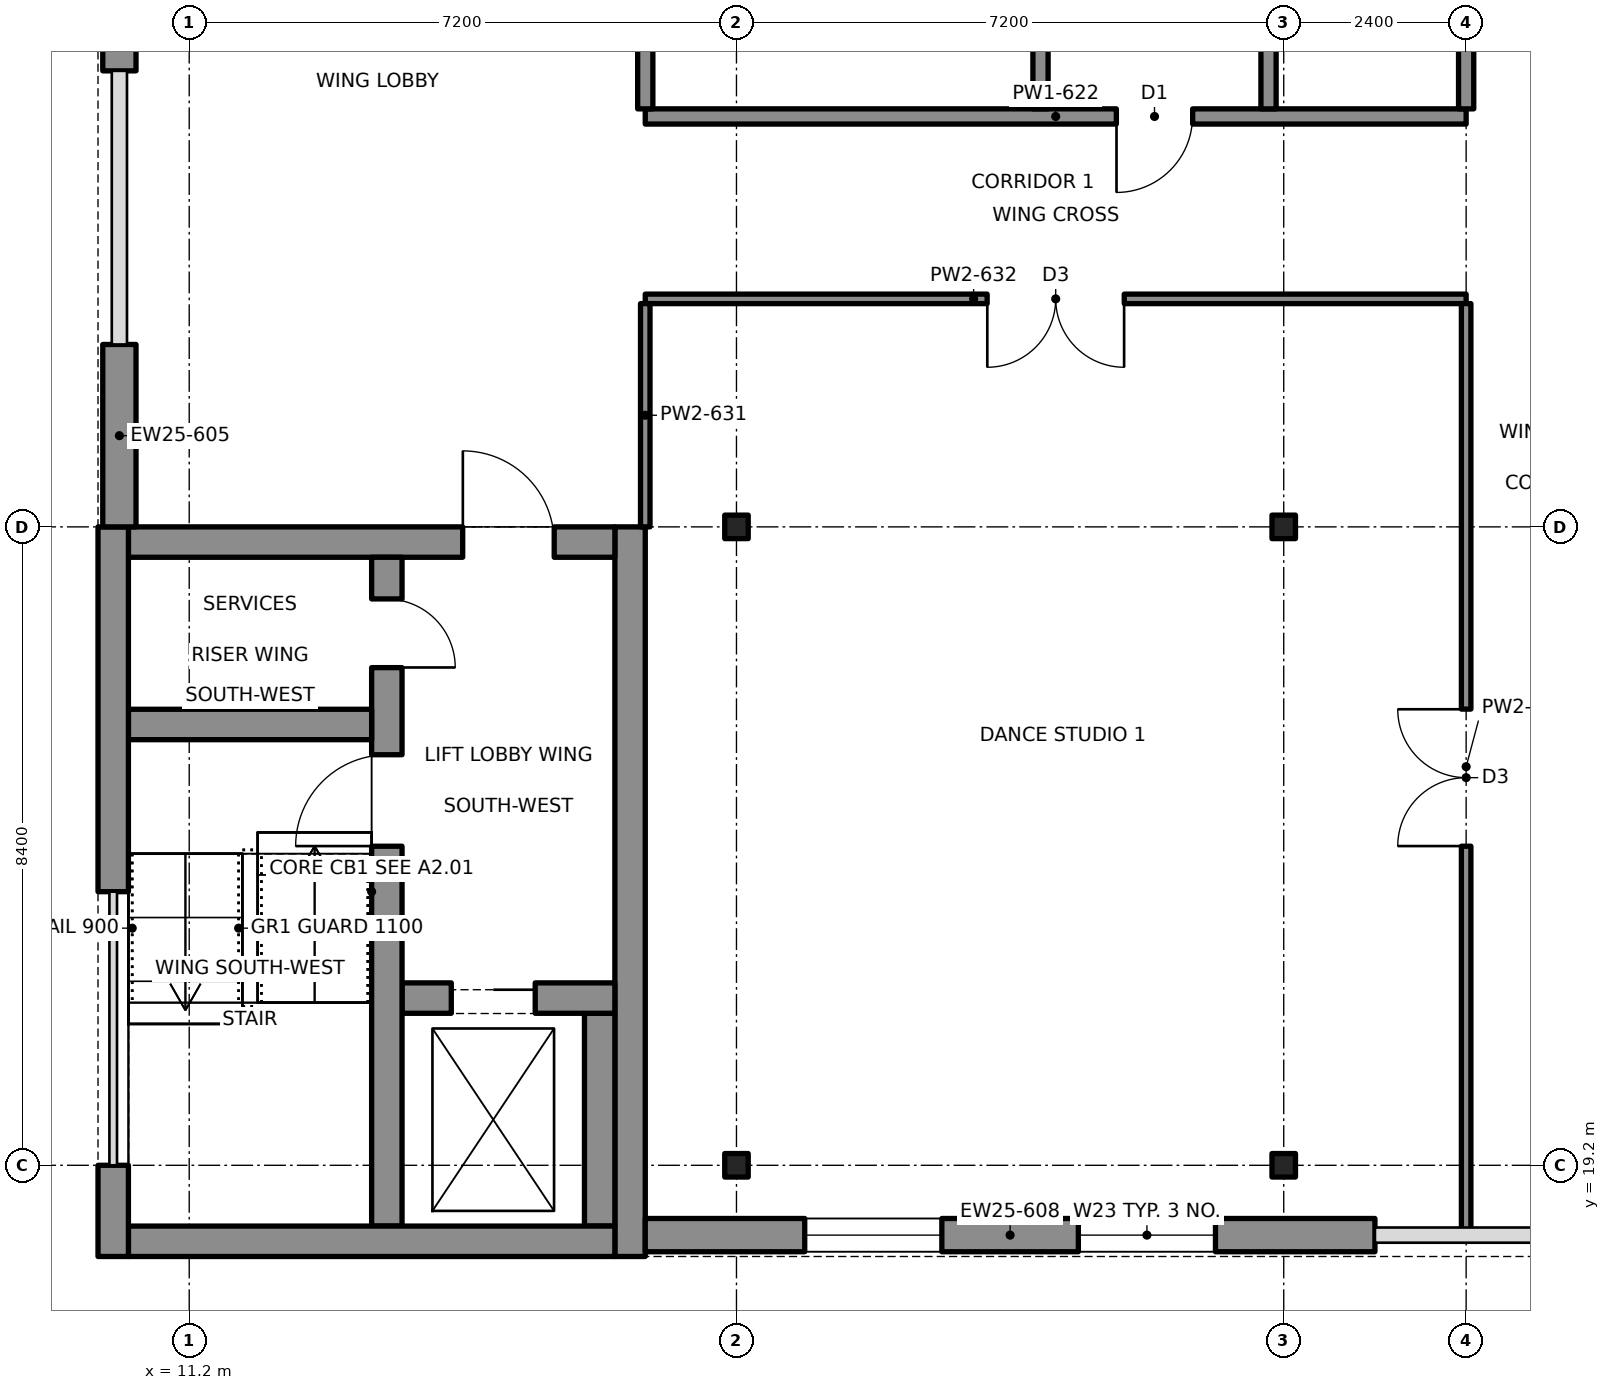
"""IFC4 building model, lengths in metres.
Left out: names, types, materials, properties, quantities, classifications, styles, units other than length and angle.
Written with IfcOpenShell. Run it as: python <this file> out.ifc"""

import sys

from ifc_helpers import new_model, si_unit, direction, frame, frame_2d, origin, origin_2d, place, context, subcontext, project, spatial, rectangle, i_section, extrude, element, fill, save


model = new_model("IFC4")
c1 = context("Model", 3, precision=1e-05, world=origin(), true_north=direction((0.0, 1.0)))
c2 = subcontext(c1, "Body", "Model", "MODEL_VIEW")
j1 = project(units=[si_unit("LENGTHUNIT", "METRE"), si_unit("PLANEANGLEUNIT", "RADIAN")], contexts=[c1])
p1 = place(None, origin())
s1 = spatial("IfcSite", under=j1, at=p1, CompositionType="ELEMENT")
p2 = place(p1, origin())
s2 = spatial("IfcBuilding", under=s1, at=p2, CompositionType="ELEMENT")
p3 = place(p2, frame((0.0, 0.0, 8.8)))
s3 = spatial("IfcBuildingStorey", under=s2, at=p3, CompositionType="ELEMENT", Elevation=8.8)
for number, where, z_axis, x_axis in (
    (1, (18.4, 19.2, 0.0), (0.0, 0.0, 1.0), (1.0, 0.0, 0.0)),
    (2, (18.4, 27.6, 0.0), (0.0, 0.0, 1.0), (1.0, 0.0, 0.0)),
    (3, (25.6, 19.2, 0.0), (0.0, 0.0, 1.0), (1.0, 0.0, 0.0)),
    (4, (25.6, 27.6, 0.0), (0.0, 0.0, 1.0), (1.0, 0.0, 0.0)),
):
    element("IfcColumn", number, at=place(p3, frame(where, z_axis=z_axis, x_axis=x_axis)), inside=s3, PredefinedType="COLUMN", context=c2, shape_type="SweptSolid", body=[
        extrude(i_section(OverallWidth=0.309, OverallDepth=0.323, WebThickness=0.014, FlangeThickness=0.023, at=origin_2d()), origin(), (0.0, 0.0, 1.0), 5.2),
    ])
p4 = place(p3, frame((17.2, 18.281, 0.0), z_axis=(0.0, 0.0, 1.0), x_axis=(1.0, 0.0, 0.0)))
e5 = element("IfcWall", 5, at=p4, inside=s3, PredefinedType="SOLIDWALL", context=c2, shape_type="SweptSolid", body=[
    extrude(rectangle(XDim=9.6, YDim=0.438, at=frame_2d((4.8, 0.0))), origin(), (0.0, 0.0, 1.0), 5.2),
])
p5 = place(p4, frame((2.1, 0.0, 0.8)))
e6 = element("IfcOpeningElement", 6, at=p5, cuts=e5, PredefinedType="OPENING", context=c2, shape_type="SweptSolid", body=[
    extrude(rectangle(XDim=1.8, YDim=3.6, at=frame_2d((0.9, 1.8))), frame((0.0, 0.229, 0.0), z_axis=(0.0, -1.0, 0.0), x_axis=(1.0, 0.0, 0.0)), (0.0, 0.0, 1.0), 0.458),
])
p6 = place(p4, frame((5.7, 0.0, 0.8)))
e7 = element("IfcOpeningElement", 7, at=p6, cuts=e5, PredefinedType="OPENING", context=c2, shape_type="SweptSolid", body=[
    extrude(rectangle(XDim=1.8, YDim=3.6, at=frame_2d((0.9, 1.8))), frame((0.0, 0.229, 0.0), z_axis=(0.0, -1.0, 0.0), x_axis=(1.0, 0.0, 0.0)), (0.0, 0.0, 1.0), 0.458),
])
p7 = place(p3, frame((10.281, 27.6, 0.0), z_axis=(0.0, 0.0, 1.0), x_axis=(0.0, 1.0, 0.0)))
e8 = element("IfcWall", 8, at=p7, inside=s3, PredefinedType="SOLIDWALL", context=c2, shape_type="SweptSolid", body=[
    extrude(rectangle(XDim=2.4, YDim=0.438, at=frame_2d((1.2, 0.0))), origin(), (0.0, 0.0, 1.0), 5.2),
])
p8 = place(p3, frame((10.281, 33.6, 0.0), z_axis=(0.0, 0.0, 1.0), x_axis=(0.0, 1.0, 0.0)))
e9 = element("IfcWall", 9, at=p8, inside=s3, PredefinedType="SOLIDWALL", context=c2, shape_type="SweptSolid", body=[
    extrude(rectangle(XDim=4.8, YDim=0.438, at=frame_2d((2.4, 0.0))), origin(), (0.0, 0.0, 1.0), 5.2),
])
p9 = place(p3, frame((10.2, 18.0, 0.0), z_axis=(0.0, 0.0, 1.0), x_axis=(0.0, 1.0, 0.0)))
e10 = element("IfcWall", 10, at=p9, inside=s3, PredefinedType="SHEAR", context=c2, shape_type="SweptSolid", body=[
    extrude(rectangle(XDim=1.2, YDim=0.4, at=frame_2d((0.6, 0.0))), origin(), (0.0, 0.0, 1.0), 5.2),
])
p10 = place(p3, frame((10.2, 22.8, 0.0), z_axis=(0.0, 0.0, 1.0), x_axis=(0.0, 1.0, 0.0)))
e11 = element("IfcWall", 11, at=p10, inside=s3, PredefinedType="SHEAR", context=c2, shape_type="SweptSolid", body=[
    extrude(rectangle(XDim=4.8, YDim=0.4, at=frame_2d((2.4, 0.0))), origin(), (0.0, 0.0, 1.0), 5.2),
])
p11 = place(p3, frame((17.0, 18.0, 0.0), z_axis=(0.0, 0.0, 1.0), x_axis=(0.0, 1.0, 0.0)))
e12 = element("IfcWall", 12, at=p11, inside=s3, PredefinedType="SHEAR", context=c2, shape_type="SweptSolid", body=[
    extrude(rectangle(XDim=9.6, YDim=0.4, at=frame_2d((4.8, 0.0))), origin(), (0.0, 0.0, 1.0), 5.2),
])
p12 = place(p3, frame((10.4, 18.2, 0.0), z_axis=(0.0, 0.0, 1.0), x_axis=(1.0, 0.0, 0.0)))
e13 = element("IfcWall", 13, at=p12, inside=s3, PredefinedType="SHEAR", context=c2, shape_type="SweptSolid", body=[
    extrude(rectangle(XDim=6.4, YDim=0.4, at=frame_2d((3.2, 0.0))), origin(), (0.0, 0.0, 1.0), 5.2),
])
p13 = place(p3, frame((10.4, 27.4, 0.0), z_axis=(0.0, 0.0, 1.0), x_axis=(1.0, 0.0, 0.0)))
e14 = element("IfcWall", 14, at=p13, inside=s3, PredefinedType="SHEAR", context=c2, shape_type="SweptSolid", body=[
    extrude(rectangle(XDim=6.4, YDim=0.4, at=frame_2d((3.2, 0.0))), origin(), (0.0, 0.0, 1.0), 5.2),
])
p14 = place(p13, frame((4.4, 0.0, 0.0)))
e15 = element("IfcOpeningElement", 15, at=p14, cuts=e14, PredefinedType="OPENING", context=c2, shape_type="SweptSolid", body=[
    extrude(rectangle(XDim=1.2, YDim=2.1, at=frame_2d((0.6, 1.05))), frame((0.0, 0.21, 0.0), z_axis=(0.0, -1.0, 0.0), x_axis=(1.0, 0.0, 0.0)), (0.0, 0.0, 1.0), 0.42),
])
p15 = place(p3, frame((13.8, 18.4, 0.0), z_axis=(0.0, 0.0, 1.0), x_axis=(0.0, 1.0, 0.0)))
e16 = element("IfcWall", 16, at=p15, inside=s3, PredefinedType="SHEAR", context=c2, shape_type="SweptSolid", body=[
    extrude(rectangle(XDim=8.8, YDim=0.4, at=frame_2d((4.4, 0.0))), origin(), (0.0, 0.0, 1.0), 5.2),
])
p16 = place(p15, frame((5.0, 0.0, 0.0)))
e17 = element("IfcOpeningElement", 17, at=p16, cuts=e16, PredefinedType="OPENING", context=c2, shape_type="SweptSolid", body=[
    extrude(rectangle(XDim=1.2, YDim=2.1, at=frame_2d((0.6, 1.05))), frame((0.0, 0.21, 0.0), z_axis=(0.0, -1.0, 0.0), x_axis=(1.0, 0.0, 0.0)), (0.0, 0.0, 1.0), 0.42),
])
p17 = place(p15, frame((7.35, 0.0, 0.0)))
e18 = element("IfcOpeningElement", 18, at=p17, cuts=e16, PredefinedType="OPENING", context=c2, shape_type="SweptSolid", body=[
    extrude(rectangle(XDim=0.9, YDim=2.1, at=frame_2d((0.45, 1.05))), frame((0.0, 0.21, 0.0), z_axis=(0.0, -1.0, 0.0), x_axis=(1.0, 0.0, 0.0)), (0.0, 0.0, 1.0), 0.42),
])
p18 = place(p3, frame((10.4, 25.0, 0.0), z_axis=(0.0, 0.0, 1.0), x_axis=(1.0, 0.0, 0.0)))
e19 = element("IfcWall", 19, at=p18, inside=s3, PredefinedType="SHEAR", context=c2, shape_type="SweptSolid", body=[
    extrude(rectangle(XDim=3.2, YDim=0.4, at=frame_2d((1.6, 0.0))), origin(), (0.0, 0.0, 1.0), 5.2),
])
p19 = place(p3, frame((14.0, 21.4, 0.0), z_axis=(0.0, 0.0, 1.0), x_axis=(1.0, 0.0, 0.0)))
e20 = element("IfcWall", 20, at=p19, inside=s3, PredefinedType="SHEAR", context=c2, shape_type="SweptSolid", body=[
    extrude(rectangle(XDim=2.8, YDim=0.4, at=frame_2d((1.4, 0.0))), origin(), (0.0, 0.0, 1.0), 5.2),
])
p20 = place(p19, frame((0.65, 0.0, 0.0)))
e21 = element("IfcOpeningElement", 21, at=p20, cuts=e20, PredefinedType="OPENING", context=c2, shape_type="SweptSolid", body=[
    extrude(rectangle(XDim=1.1, YDim=2.1, at=frame_2d((0.55, 1.05))), frame((0.0, 0.21, 0.0), z_axis=(0.0, -1.0, 0.0), x_axis=(1.0, 0.0, 0.0)), (0.0, 0.0, 1.0), 0.42),
])
p21 = place(p3, frame((16.6, 18.4, 0.0), z_axis=(0.0, 0.0, 1.0), x_axis=(0.0, 1.0, 0.0)))
e22 = element("IfcWall", 22, at=p21, inside=s3, PredefinedType="SHEAR", context=c2, shape_type="SweptSolid", body=[
    extrude(rectangle(XDim=2.8, YDim=0.4, at=frame_2d((1.4, 0.0))), origin(), (0.0, 0.0, 1.0), 5.2),
])
p22 = place(p3, frame((17.2, 30.6, 0.0), z_axis=(0.0, 0.0, 1.0), x_axis=(1.0, 0.0, 0.0)))
e23 = element("IfcWall", 23, at=p22, inside=s3, PredefinedType="PARTITIONING", context=c2, shape_type="SweptSolid", body=[
    extrude(rectangle(XDim=10.8, YDim=0.125, at=frame_2d((5.4, 0.0))), origin(), (0.0, 0.0, 1.0), 4.45),
])
p23 = place(p22, frame((4.5, 0.0, 0.0)))
e24 = element("IfcOpeningElement", 24, at=p23, cuts=e23, PredefinedType="OPENING", context=c2, shape_type="SweptSolid", body=[
    extrude(rectangle(XDim=1.8, YDim=2.1, at=frame_2d((0.9, 1.05))), frame((0.0, 0.073, 0.0), z_axis=(0.0, -1.0, 0.0), x_axis=(1.0, 0.0, 0.0)), (0.0, 0.0, 1.0), 0.145),
])
p24 = place(p3, frame((17.2, 33.0, 0.0), z_axis=(0.0, 0.0, 1.0), x_axis=(1.0, 0.0, 0.0)))
e25 = element("IfcWall", 25, at=p24, inside=s3, PredefinedType="PARTITIONING", context=c2, shape_type="SweptSolid", body=[
    extrude(rectangle(XDim=10.8, YDim=0.2, at=frame_2d((5.4, 0.0))), origin(), (0.0, 0.0, 1.0), 4.45),
])
p25 = place(p24, frame((6.2, 0.0, 0.0)))
e26 = element("IfcOpeningElement", 26, at=p25, cuts=e25, PredefinedType="OPENING", context=c2, shape_type="SweptSolid", body=[
    extrude(rectangle(XDim=1.0, YDim=2.1, at=frame_2d((0.5, 1.05))), frame((0.0, 0.11, 0.0), z_axis=(0.0, -1.0, 0.0), x_axis=(1.0, 0.0, 0.0)), (0.0, 0.0, 1.0), 0.22),
])
p26 = place(p3, frame((17.2, 27.6, 0.0), z_axis=(0.0, 0.0, 1.0), x_axis=(0.0, 1.0, 0.0)))
e27 = element("IfcWall", 27, at=p26, inside=s3, PredefinedType="PARTITIONING", context=c2, shape_type="SweptSolid", body=[
    extrude(rectangle(XDim=2.938, YDim=0.125, at=frame_2d((1.469, 0.0))), origin(), (0.0, 0.0, 1.0), 4.45),
])
p27 = place(p3, frame((17.2, 33.1, 0.0), z_axis=(0.0, 0.0, 1.0), x_axis=(0.0, 1.0, 0.0)))
e28 = element("IfcWall", 28, at=p27, inside=s3, PredefinedType="PARTITIONING", context=c2, shape_type="SweptSolid", body=[
    extrude(rectangle(XDim=5.8, YDim=0.2, at=frame_2d((2.9, 0.0))), origin(), (0.0, 0.0, 1.0), 4.45),
])
p28 = place(p27, frame((3.4, 0.0, 0.0)))
e29 = element("IfcOpeningElement", 29, at=p28, cuts=e28, PredefinedType="OPENING", context=c2, shape_type="SweptSolid", body=[
    extrude(rectangle(XDim=1.0, YDim=2.1, at=frame_2d((0.5, 1.05))), frame((0.0, 0.11, 0.0), z_axis=(0.0, -1.0, 0.0), x_axis=(1.0, 0.0, 0.0)), (0.0, 0.0, 1.0), 0.22),
])
for number, where, z_axis, x_axis in (
    (30, (22.4, 33.1, 0.0), (0.0, 0.0, 1.0), (0.0, 1.0, 0.0)),
    (31, (25.4, 33.1, 0.0), (0.0, 0.0, 1.0), (0.0, 1.0, 0.0)),
):
    element("IfcWall", number, at=place(p3, frame(where, z_axis=z_axis, x_axis=x_axis)), inside=s3, PredefinedType="PARTITIONING", context=c2, shape_type="SweptSolid", body=[
        extrude(rectangle(XDim=5.8, YDim=0.2, at=frame_2d((2.9, 0.0))), origin(), (0.0, 0.0, 1.0), 4.45),
    ])
p29 = place(p3, frame((28.0, 18.351, 0.0), z_axis=(0.0, 0.0, 1.0), x_axis=(0.0, 1.0, 0.0)))
e32 = element("IfcWall", 32, at=p29, inside=s3, PredefinedType="PARTITIONING", context=c2, shape_type="SweptSolid", body=[
    extrude(rectangle(XDim=12.186, YDim=0.125, at=frame_2d((6.093, 0.0))), origin(), (0.0, 0.0, 1.0), 4.45),
])
p30 = place(p29, frame((5.049, 0.0, 0.0)))
e33 = element("IfcOpeningElement", 33, at=p30, cuts=e32, PredefinedType="OPENING", context=c2, shape_type="SweptSolid", body=[
    extrude(rectangle(XDim=1.8, YDim=2.1, at=frame_2d((0.9, 1.05))), frame((0.0, 0.073, 0.0), z_axis=(0.0, -1.0, 0.0), x_axis=(1.0, 0.0, 0.0)), (0.0, 0.0, 1.0), 0.145),
])
p31 = place(p3, frame((28.0, 33.1, 0.0), z_axis=(0.0, 0.0, 1.0), x_axis=(0.0, 1.0, 0.0)))
e34 = element("IfcWall", 34, at=p31, inside=s3, PredefinedType="PARTITIONING", context=c2, shape_type="SweptSolid", body=[
    extrude(rectangle(XDim=5.8, YDim=0.2, at=frame_2d((2.9, 0.0))), origin(), (0.0, 0.0, 1.0), 4.45),
])
p32 = place(p31, frame((3.4, 0.0, 0.0)))
e35 = element("IfcOpeningElement", 35, at=p32, cuts=e34, PredefinedType="OPENING", context=c2, shape_type="SweptSolid", body=[
    extrude(rectangle(XDim=1.0, YDim=2.1, at=frame_2d((0.5, 1.05))), frame((0.0, 0.11, 0.0), z_axis=(0.0, -1.0, 0.0), x_axis=(1.0, 0.0, 0.0)), (0.0, 0.0, 1.0), 0.22),
])
p33 = place(p5, origin())
e36 = element("IfcWindow", 36, at=p33, inside=s3, PartitioningType="SINGLE_PANEL", PredefinedType="WINDOW", context=c2, shape_type="SweptSolid", body=[
    extrude(rectangle(XDim=1.8, YDim=3.6, at=frame_2d((0.9, 1.8))), frame((0.0, 0.03, 0.0), z_axis=(0.0, -1.0, 0.0), x_axis=(1.0, 0.0, 0.0)), (0.0, 0.0, 1.0), 0.06),
])
fill(e6, e36)
p34 = place(p6, origin())
e37 = element("IfcWindow", 37, at=p34, inside=s3, PartitioningType="SINGLE_PANEL", PredefinedType="WINDOW", context=c2, shape_type="SweptSolid", body=[
    extrude(rectangle(XDim=1.8, YDim=3.6, at=frame_2d((0.9, 1.8))), frame((0.0, 0.03, 0.0), z_axis=(0.0, -1.0, 0.0), x_axis=(1.0, 0.0, 0.0)), (0.0, 0.0, 1.0), 0.06),
])
fill(e7, e37)
p35 = place(p14, origin())
e38 = element("IfcDoor", 38, at=p35, inside=s3, OperationType="SINGLE_SWING_LEFT", PredefinedType="DOOR", context=c2, shape_type="SweptSolid", body=[
    extrude(rectangle(XDim=1.2, YDim=2.1, at=frame_2d((0.6, 1.05))), frame((0.0, 0.025, 0.0), z_axis=(0.0, -1.0, 0.0), x_axis=(1.0, 0.0, 0.0)), (0.0, 0.0, 1.0), 0.05),
])
fill(e15, e38)
p36 = place(p16, origin())
e39 = element("IfcDoor", 39, at=p36, inside=s3, OperationType="SINGLE_SWING_LEFT", PredefinedType="DOOR", context=c2, shape_type="SweptSolid", body=[
    extrude(rectangle(XDim=1.2, YDim=2.1, at=frame_2d((0.6, 1.05))), frame((0.0, 0.025, 0.0), z_axis=(0.0, -1.0, 0.0), x_axis=(1.0, 0.0, 0.0)), (0.0, 0.0, 1.0), 0.05),
])
fill(e17, e39)
p37 = place(p17, origin())
e40 = element("IfcDoor", 40, at=p37, inside=s3, OperationType="SINGLE_SWING_LEFT", PredefinedType="DOOR", context=c2, shape_type="SweptSolid", body=[
    extrude(rectangle(XDim=0.9, YDim=2.1, at=frame_2d((0.45, 1.05))), frame((0.0, 0.025, 0.0), z_axis=(0.0, -1.0, 0.0), x_axis=(1.0, 0.0, 0.0)), (0.0, 0.0, 1.0), 0.05),
])
fill(e18, e40)
p38 = place(p20, origin())
e41 = element("IfcDoor", 41, at=p38, inside=s3, OperationType="SLIDING_TO_LEFT", PredefinedType="DOOR", context=c2, shape_type="SweptSolid", body=[
    extrude(rectangle(XDim=1.1, YDim=2.1, at=frame_2d((0.55, 1.05))), frame((0.0, 0.025, 0.0), z_axis=(0.0, -1.0, 0.0), x_axis=(1.0, 0.0, 0.0)), (0.0, 0.0, 1.0), 0.05),
])
fill(e21, e41)
p39 = place(p30, origin())
e42 = element("IfcDoor", 42, at=p39, inside=s3, OperationType="DOUBLE_DOOR_SINGLE_SWING", PredefinedType="DOOR", context=c2, shape_type="SweptSolid", body=[
    extrude(rectangle(XDim=1.8, YDim=2.1, at=frame_2d((0.9, 1.05))), frame((0.0, 0.025, 0.0), z_axis=(0.0, -1.0, 0.0), x_axis=(1.0, 0.0, 0.0)), (0.0, 0.0, 1.0), 0.05),
])
fill(e33, e42)
p40 = place(p25, origin())
e43 = element("IfcDoor", 43, at=p40, inside=s3, OperationType="SINGLE_SWING_LEFT", PredefinedType="DOOR", context=c2, shape_type="SweptSolid", body=[
    extrude(rectangle(XDim=1.0, YDim=2.1, at=frame_2d((0.5, 1.05))), frame((0.0, 0.025, 0.0), z_axis=(0.0, -1.0, 0.0), x_axis=(1.0, 0.0, 0.0)), (0.0, 0.0, 1.0), 0.05),
])
fill(e26, e43)
p41 = place(p23, origin())
e44 = element("IfcDoor", 44, at=p41, inside=s3, OperationType="DOUBLE_DOOR_SINGLE_SWING", PredefinedType="DOOR", context=c2, shape_type="SweptSolid", body=[
    extrude(rectangle(XDim=1.8, YDim=2.1, at=frame_2d((0.9, 1.05))), frame((0.0, 0.025, 0.0), z_axis=(0.0, -1.0, 0.0), x_axis=(1.0, 0.0, 0.0)), (0.0, 0.0, 1.0), 0.05),
])
fill(e24, e44)
save(model, sys.argv[1])
